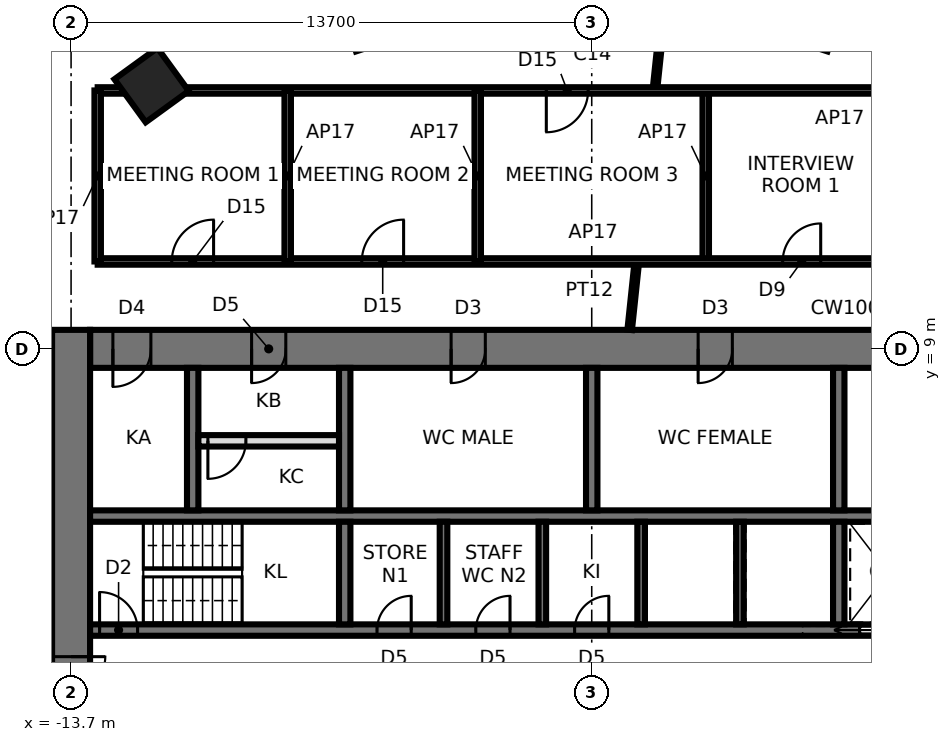
"""IFC4 building model, lengths in metres.
Left out: names, types, materials, properties, quantities, classifications, styles, units other than length and angle.
Written with IfcOpenShell. Run it as: python <this file> out.ifc"""

import sys

from ifc_helpers import new_model, si_unit, direction, frame, frame_2d, origin, origin_2d, place, context, subcontext, project, spatial, rectangle, extrude, element, fill, save


model = new_model("IFC4")
c1 = context("Model", 3, precision=1e-05, world=origin(), true_north=direction((0.0, 1.0)))
c2 = subcontext(c1, "Body", "Model", "MODEL_VIEW")
j1 = project(units=[si_unit("LENGTHUNIT", "METRE"), si_unit("PLANEANGLEUNIT", "RADIAN")], contexts=[c1])
p1 = place(None, origin())
s1 = spatial("IfcSite", under=j1, at=p1, CompositionType="ELEMENT")
p2 = place(p1, origin())
s2 = spatial("IfcBuilding", under=s1, at=p2, CompositionType="ELEMENT")
p3 = place(p2, frame((0.0, 0.0, 234.5)))
s3 = spatial("IfcBuildingStorey", under=s2, at=p3, CompositionType="ELEMENT", Elevation=234.5)
p4 = place(p3, frame((-11.581, 15.94, 0.0), z_axis=(0.0, 0.0, 1.0), x_axis=(-0.587785252292, 0.809016994375, 0.0)))
e1 = element("IfcColumn", 1, at=p4, inside=s3, PredefinedType="COLUMN", context=c2, shape_type="SweptSolid", body=[
    extrude(rectangle(XDim=1.4, YDim=1.4, at=origin_2d()), origin(), (0.0, 0.0, 1.0), 3.9),
])
p5 = place(p3, frame((13.2, 9.0, 0.0), z_axis=(0.0, 0.0, 1.0), x_axis=(-1.0, 0.0, 0.0)))
e2 = element("IfcWall", 2, at=p5, inside=s3, PredefinedType="SHEAR", context=c2, shape_type="SweptSolid", body=[
    extrude(rectangle(XDim=26.4, YDim=1.0, at=frame_2d((13.2, 0.0))), origin(), (0.0, 0.0, 1.0), 3.9),
])
p6 = place(p5, frame((2.65, 0.0, 0.0)))
e3 = element("IfcOpeningElement", 3, at=p6, cuts=e2, PredefinedType="OPENING", context=c2, shape_type="SweptSolid", body=[
    extrude(rectangle(XDim=0.9, YDim=2.1, at=frame_2d((0.45, 1.05))), frame((0.0, 0.51, 0.0), z_axis=(0.0, -1.0, 0.0), x_axis=(1.0, 0.0, 0.0)), (0.0, 0.0, 1.0), 1.02),
])
p7 = place(p5, frame((9.5, 0.0, 0.0)))
e4 = element("IfcOpeningElement", 4, at=p7, cuts=e2, PredefinedType="OPENING", context=c2, shape_type="SweptSolid", body=[
    extrude(rectangle(XDim=0.9, YDim=2.1, at=frame_2d((0.45, 1.05))), frame((0.0, 0.51, 0.0), z_axis=(0.0, -1.0, 0.0), x_axis=(1.0, 0.0, 0.0)), (0.0, 0.0, 1.0), 1.02),
])
p8 = place(p5, frame((16.0, 0.0, 0.0)))
e5 = element("IfcOpeningElement", 5, at=p8, cuts=e2, PredefinedType="OPENING", context=c2, shape_type="SweptSolid", body=[
    extrude(rectangle(XDim=0.9, YDim=2.1, at=frame_2d((0.45, 1.05))), frame((0.0, 0.51, 0.0), z_axis=(0.0, -1.0, 0.0), x_axis=(1.0, 0.0, 0.0)), (0.0, 0.0, 1.0), 1.02),
])
p9 = place(p5, frame((21.25, 0.0, 0.0)))
e6 = element("IfcOpeningElement", 6, at=p9, cuts=e2, PredefinedType="OPENING", context=c2, shape_type="SweptSolid", body=[
    extrude(rectangle(XDim=0.9, YDim=2.1, at=frame_2d((0.45, 1.05))), frame((0.0, 0.51, 0.0), z_axis=(0.0, -1.0, 0.0), x_axis=(1.0, 0.0, 0.0)), (0.0, 0.0, 1.0), 1.02),
])
p10 = place(p5, frame((24.8, 0.0, 0.0)))
e7 = element("IfcOpeningElement", 7, at=p10, cuts=e2, PredefinedType="OPENING", context=c2, shape_type="SweptSolid", body=[
    extrude(rectangle(XDim=1.0, YDim=2.1, at=frame_2d((0.5, 1.05))), frame((0.0, 0.51, 0.0), z_axis=(0.0, -1.0, 0.0), x_axis=(1.0, 0.0, 0.0)), (0.0, 0.0, 1.0), 1.02),
])
p11 = place(p3, frame((-13.7, 9.5, 0.0), z_axis=(0.0, 0.0, 1.0), x_axis=(0.0, -1.0, 0.0)))
e8 = element("IfcWall", 8, at=p11, inside=s3, PredefinedType="SHEAR", context=c2, shape_type="SweptSolid", body=[
    extrude(rectangle(XDim=19.0, YDim=1.0, at=frame_2d((9.5, 0.0))), origin(), (0.0, 0.0, 1.0), 3.9),
])
p12 = place(p11, frame((8.6, 0.0, 0.0)))
e9 = element("IfcOpeningElement", 9, at=p12, cuts=e8, PredefinedType="OPENING", context=c2, shape_type="SweptSolid", body=[
    extrude(rectangle(XDim=1.8, YDim=2.4, at=frame_2d((0.9, 1.2))), frame((0.0, 0.51, 0.0), z_axis=(0.0, -1.0, 0.0), x_axis=(1.0, 0.0, 0.0)), (0.0, 0.0, 1.0), 1.02),
])
p13 = place(p3, frame((-13.2, 1.6, 0.0), z_axis=(0.0, 0.0, 1.0), x_axis=(1.0, 0.0, 0.0)))
e10 = element("IfcWall", 10, at=p13, inside=s3, PredefinedType="SHEAR", context=c2, shape_type="SweptSolid", body=[
    extrude(rectangle(XDim=26.4, YDim=0.3, at=frame_2d((13.2, 0.0))), origin(), (0.0, 0.0, 1.0), 3.9),
])
p14 = place(p13, frame((0.25, 0.0, 0.0)))
e11 = element("IfcOpeningElement", 11, at=p14, cuts=e10, PredefinedType="OPENING", context=c2, shape_type="SweptSolid", body=[
    extrude(rectangle(XDim=1.0, YDim=2.1, at=frame_2d((0.5, 1.05))), frame((0.0, 0.16, 0.0), z_axis=(0.0, -1.0, 0.0), x_axis=(1.0, 0.0, 0.0)), (0.0, 0.0, 1.0), 0.32),
])
p15 = place(p13, frame((23.05, 0.0, 0.0)))
e12 = element("IfcOpeningElement", 12, at=p15, cuts=e10, PredefinedType="OPENING", context=c2, shape_type="SweptSolid", body=[
    extrude(rectangle(XDim=1.1, YDim=2.3, at=frame_2d((0.55, 1.15))), frame((0.0, 0.16, 0.0), z_axis=(0.0, -1.0, 0.0), x_axis=(1.0, 0.0, 0.0)), (0.0, 0.0, 1.0), 0.32),
])
p16 = place(p13, frame((20.25, 0.0, 0.0)))
e13 = element("IfcOpeningElement", 13, at=p16, cuts=e10, PredefinedType="OPENING", context=c2, shape_type="SweptSolid", body=[
    extrude(rectangle(XDim=1.5, YDim=2.4, at=frame_2d((0.75, 1.2))), frame((0.0, 0.16, 0.0), z_axis=(0.0, -1.0, 0.0), x_axis=(1.0, 0.0, 0.0)), (0.0, 0.0, 1.0), 0.32),
])
p17 = place(p13, frame((7.55, 0.0, 0.0)))
e14 = element("IfcOpeningElement", 14, at=p17, cuts=e10, PredefinedType="OPENING", context=c2, shape_type="SweptSolid", body=[
    extrude(rectangle(XDim=0.9, YDim=2.1, at=frame_2d((0.45, 1.05))), frame((0.0, 0.16, 0.0), z_axis=(0.0, -1.0, 0.0), x_axis=(1.0, 0.0, 0.0)), (0.0, 0.0, 1.0), 0.32),
])
p18 = place(p13, frame((10.15, 0.0, 0.0)))
e15 = element("IfcOpeningElement", 15, at=p18, cuts=e10, PredefinedType="OPENING", context=c2, shape_type="SweptSolid", body=[
    extrude(rectangle(XDim=0.9, YDim=2.1, at=frame_2d((0.45, 1.05))), frame((0.0, 0.16, 0.0), z_axis=(0.0, -1.0, 0.0), x_axis=(1.0, 0.0, 0.0)), (0.0, 0.0, 1.0), 0.32),
])
p19 = place(p13, frame((12.75, 0.0, 0.0)))
e16 = element("IfcOpeningElement", 16, at=p19, cuts=e10, PredefinedType="OPENING", context=c2, shape_type="SweptSolid", body=[
    extrude(rectangle(XDim=0.9, YDim=2.1, at=frame_2d((0.45, 1.05))), frame((0.0, 0.16, 0.0), z_axis=(0.0, -1.0, 0.0), x_axis=(1.0, 0.0, 0.0)), (0.0, 0.0, 1.0), 0.32),
])
p20 = place(p13, frame((25.45, 0.0, 0.0)))
e17 = element("IfcOpeningElement", 17, at=p20, cuts=e10, PredefinedType="OPENING", context=c2, shape_type="SweptSolid", body=[
    extrude(rectangle(XDim=0.9, YDim=2.1, at=frame_2d((0.45, 1.05))), frame((0.0, 0.16, 0.0), z_axis=(0.0, -1.0, 0.0), x_axis=(1.0, 0.0, 0.0)), (0.0, 0.0, 1.0), 0.32),
])
p21 = place(p3, frame((-13.2, 4.6, 0.0), z_axis=(0.0, 0.0, 1.0), x_axis=(1.0, 0.0, 0.0)))
e18 = element("IfcWall", 18, at=p21, inside=s3, PredefinedType="SHEAR", context=c2, shape_type="SweptSolid", body=[
    extrude(rectangle(XDim=26.4, YDim=0.3, at=frame_2d((13.2, 0.0))), origin(), (0.0, 0.0, 1.0), 3.9),
])
p22 = place(p3, frame((-6.5, 1.75, 0.0), z_axis=(0.0, 0.0, 1.0), x_axis=(0.0, 1.0, 0.0)))
e19 = element("IfcWall", 19, at=p22, inside=s3, PredefinedType="SHEAR", context=c2, shape_type="SweptSolid", body=[
    extrude(rectangle(XDim=2.7, YDim=0.3, at=frame_2d((1.35, 0.0))), origin(), (0.0, 0.0, 1.0), 3.9),
])
p23 = place(p3, frame((-6.5, 4.75, 0.0), z_axis=(0.0, 0.0, 1.0), x_axis=(0.0, 1.0, 0.0)))
e20 = element("IfcWall", 20, at=p23, inside=s3, PredefinedType="SHEAR", context=c2, shape_type="SweptSolid", body=[
    extrude(rectangle(XDim=3.75, YDim=0.3, at=frame_2d((1.875, 0.0))), origin(), (0.0, 0.0, 1.0), 3.9),
])
p24 = place(p3, frame((6.5, 1.75, 0.0), z_axis=(0.0, 0.0, 1.0), x_axis=(0.0, 1.0, 0.0)))
e21 = element("IfcWall", 21, at=p24, inside=s3, PredefinedType="SHEAR", context=c2, shape_type="SweptSolid", body=[
    extrude(rectangle(XDim=2.7, YDim=0.3, at=frame_2d((1.35, 0.0))), origin(), (0.0, 0.0, 1.0), 3.9),
])
p25 = place(p3, frame((6.5, 4.75, 0.0), z_axis=(0.0, 0.0, 1.0), x_axis=(0.0, 1.0, 0.0)))
e22 = element("IfcWall", 22, at=p25, inside=s3, PredefinedType="SHEAR", context=c2, shape_type="SweptSolid", body=[
    extrude(rectangle(XDim=3.75, YDim=0.3, at=frame_2d((1.875, 0.0))), origin(), (0.0, 0.0, 1.0), 3.9),
])
for number, where, z_axis, x_axis in (
    (23, (-3.9, 1.75, 0.0), (0.0, 0.0, 1.0), (0.0, 1.0, 0.0)),
    (24, (-1.3, 1.75, 0.0), (0.0, 0.0, 1.0), (0.0, 1.0, 0.0)),
    (25, (1.3, 1.75, 0.0), (0.0, 0.0, 1.0), (0.0, 1.0, 0.0)),
    (26, (3.9, 1.75, 0.0), (0.0, 0.0, 1.0), (0.0, 1.0, 0.0)),
):
    element("IfcWall", number, at=place(p3, frame(where, z_axis=z_axis, x_axis=x_axis)), inside=s3, PredefinedType="SHEAR", context=c2, shape_type="SweptSolid", body=[
        extrude(rectangle(XDim=2.7, YDim=0.2, at=frame_2d((1.35, 0.0))), origin(), (0.0, 0.0, 1.0), 3.9),
    ])
for number, where, z_axis, x_axis in (
    (27, (0.0, 4.75, 0.0), (0.0, 0.0, 1.0), (0.0, 1.0, 0.0)),
    (28, (-10.5, 4.75, 0.0), (0.0, 0.0, 1.0), (0.0, 1.0, 0.0)),
):
    element("IfcWall", number, at=place(p3, frame(where, z_axis=z_axis, x_axis=x_axis)), inside=s3, PredefinedType="SHEAR", context=c2, shape_type="SweptSolid", body=[
        extrude(rectangle(XDim=3.75, YDim=0.3, at=frame_2d((1.875, 0.0))), origin(), (0.0, 0.0, 1.0), 3.9),
    ])
p26 = place(p3, frame((-10.35, 6.58, 0.0), z_axis=(0.0, 0.0, 1.0), x_axis=(1.0, 0.0, 0.0)))
e29 = element("IfcWall", 29, at=p26, inside=s3, PredefinedType="PARTITIONING", context=c2, shape_type="SweptSolid", body=[
    extrude(rectangle(XDim=3.7, YDim=0.3, at=frame_2d((1.85, 0.0))), origin(), (0.0, 0.0, 1.0), 3.74),
])
p27 = place(p26, frame((0.25, 0.0, 0.0)))
e30 = element("IfcOpeningElement", 30, at=p27, cuts=e29, PredefinedType="OPENING", context=c2, shape_type="SweptSolid", body=[
    extrude(rectangle(XDim=1.0, YDim=2.4, at=frame_2d((0.5, 1.2))), frame((0.0, 0.16, 0.0), z_axis=(0.0, -1.0, 0.0), x_axis=(1.0, 0.0, 0.0)), (0.0, 0.0, 1.0), 0.32),
])
p28 = place(p3, frame((3.0, 15.8, 0.0), z_axis=(0.0, 0.0, 1.0), x_axis=(0.0, -1.0, 0.0)))
e31 = element("IfcWall", 31, at=p28, inside=s3, PredefinedType="PARTITIONING", context=c2, shape_type="SweptSolid", body=[
    extrude(rectangle(XDim=4.5, YDim=0.17, at=frame_2d((2.25, 0.0))), origin(), (0.0, 0.0, 1.0), 3.74),
])
p29 = place(p3, frame((1.661, 15.8, 0.0), z_axis=(0.0, 0.0, 1.0), x_axis=(0.104548874513, 0.994519749848, 0.0)))
e32 = element("IfcWall", 32, at=p29, inside=s3, PredefinedType="PARTITIONING", context=c2, shape_type="SweptSolid", body=[
    extrude(rectangle(XDim=4.302, YDim=0.12, at=frame_2d((2.151, 0.0))), origin(), (0.0, 0.0, 1.0), 3.74),
])
p30 = place(p3, frame((0.999, 9.5, 0.0), z_axis=(0.0, 0.0, 1.0), x_axis=(0.104537331683, 0.99452096322, 0.0)))
e33 = element("IfcWall", 33, at=p30, inside=s3, PredefinedType="PARTITIONING", context=c2, shape_type="SweptSolid", body=[
    extrude(rectangle(XDim=1.81, YDim=0.12, at=frame_2d((0.905, 0.0))), origin(), (0.0, 0.0, 1.0), 3.74),
])
p31 = place(p3, frame((-13.0, 11.3, 0.0), z_axis=(0.0, 0.0, 1.0), x_axis=(1.0, 0.0, 0.0)))
e34 = element("IfcWall", 34, at=p31, inside=s3, PredefinedType="PARTITIONING", context=c2, shape_type="SweptSolid", body=[
    extrude(rectangle(XDim=26.0, YDim=0.17, at=frame_2d((13.0, 0.0))), origin(), (0.0, 0.0, 1.0), 3.74),
])
p32 = place(p31, frame((1.95, 0.0, 0.0)))
e35 = element("IfcOpeningElement", 35, at=p32, cuts=e34, PredefinedType="OPENING", context=c2, shape_type="SweptSolid", body=[
    extrude(rectangle(XDim=1.1, YDim=2.4, at=frame_2d((0.55, 1.2))), frame((0.0, 0.095, 0.0), z_axis=(0.0, -1.0, 0.0), x_axis=(1.0, 0.0, 0.0)), (0.0, 0.0, 1.0), 0.19),
])
p33 = place(p31, frame((6.95, 0.0, 0.0)))
e36 = element("IfcOpeningElement", 36, at=p33, cuts=e34, PredefinedType="OPENING", context=c2, shape_type="SweptSolid", body=[
    extrude(rectangle(XDim=1.1, YDim=2.4, at=frame_2d((0.55, 1.2))), frame((0.0, 0.095, 0.0), z_axis=(0.0, -1.0, 0.0), x_axis=(1.0, 0.0, 0.0)), (0.0, 0.0, 1.0), 0.19),
])
p34 = place(p31, frame((18.025, 0.0, 0.0)))
e37 = element("IfcOpeningElement", 37, at=p34, cuts=e34, PredefinedType="OPENING", context=c2, shape_type="SweptSolid", body=[
    extrude(rectangle(XDim=1.0, YDim=2.4, at=frame_2d((0.5, 1.2))), frame((0.0, 0.095, 0.0), z_axis=(0.0, -1.0, 0.0), x_axis=(1.0, 0.0, 0.0)), (0.0, 0.0, 1.0), 0.19),
])
p35 = place(p31, frame((23.025, 0.0, 0.0)))
e38 = element("IfcOpeningElement", 38, at=p35, cuts=e34, PredefinedType="OPENING", context=c2, shape_type="SweptSolid", body=[
    extrude(rectangle(XDim=1.0, YDim=2.4, at=frame_2d((0.5, 1.2))), frame((0.0, 0.095, 0.0), z_axis=(0.0, -1.0, 0.0), x_axis=(1.0, 0.0, 0.0)), (0.0, 0.0, 1.0), 0.19),
])
p36 = place(p3, frame((13.0, 15.8, 0.0), z_axis=(0.0, 0.0, 1.0), x_axis=(-1.0, 0.0, 0.0)))
e39 = element("IfcWall", 39, at=p36, inside=s3, PredefinedType="PARTITIONING", context=c2, shape_type="SweptSolid", body=[
    extrude(rectangle(XDim=26.0, YDim=0.17, at=frame_2d((13.0, 0.0))), origin(), (0.0, 0.0, 1.0), 3.74),
])
p37 = place(p36, frame((13.095, 0.0, 0.0)))
e40 = element("IfcOpeningElement", 40, at=p37, cuts=e39, PredefinedType="OPENING", context=c2, shape_type="SweptSolid", body=[
    extrude(rectangle(XDim=1.1, YDim=2.4, at=frame_2d((0.55, 1.2))), frame((0.0, 0.095, 0.0), z_axis=(0.0, -1.0, 0.0), x_axis=(1.0, 0.0, 0.0)), (0.0, 0.0, 1.0), 0.19),
])
for number, where, z_axis, x_axis in (
    (41, (-3.0, 15.8, 0.0), (0.0, 0.0, 1.0), (0.0, -1.0, 0.0)),
    (42, (-8.0, 15.8, 0.0), (0.0, 0.0, 1.0), (0.0, -1.0, 0.0)),
    (43, (-13.0, 15.8, 0.0), (0.0, 0.0, 1.0), (0.0, -1.0, 0.0)),
):
    element("IfcWall", number, at=place(p3, frame(where, z_axis=z_axis, x_axis=x_axis)), inside=s3, PredefinedType="PARTITIONING", context=c2, shape_type="SweptSolid", body=[
        extrude(rectangle(XDim=4.5, YDim=0.17, at=frame_2d((2.25, 0.0))), origin(), (0.0, 0.0, 1.0), 3.74),
    ])
p38 = place(p12, origin())
e44 = element("IfcDoor", 44, at=p38, inside=s3, OperationType="DOUBLE_DOOR_SINGLE_SWING", PredefinedType="DOOR", context=c2, shape_type="SweptSolid", body=[
    extrude(rectangle(XDim=1.72, YDim=2.36, at=frame_2d((0.9, 1.18))), frame((0.0, 0.025, 0.0), z_axis=(0.0, -1.0, 0.0), x_axis=(1.0, 0.0, 0.0)), (0.0, 0.0, 1.0), 0.05),
    extrude(rectangle(XDim=0.04, YDim=2.4, at=frame_2d((0.02, 1.2))), frame((0.0, 0.25, 0.0), z_axis=(0.0, -1.0, 0.0), x_axis=(1.0, 0.0, 0.0)), (0.0, 0.0, 1.0), 0.5),
    extrude(rectangle(XDim=0.04, YDim=2.4, at=frame_2d((1.78, 1.2))), frame((0.0, 0.25, 0.0), z_axis=(0.0, -1.0, 0.0), x_axis=(1.0, 0.0, 0.0)), (0.0, 0.0, 1.0), 0.5),
    extrude(rectangle(XDim=1.72, YDim=0.04, at=frame_2d((0.9, 2.38))), frame((0.0, 0.25, 0.0), z_axis=(0.0, -1.0, 0.0), x_axis=(1.0, 0.0, 0.0)), (0.0, 0.0, 1.0), 0.5),
])
fill(e9, e44)
p39 = place(p14, origin())
e45 = element("IfcDoor", 45, at=p39, inside=s3, OperationType="SINGLE_SWING_LEFT", PredefinedType="DOOR", context=c2, shape_type="SweptSolid", body=[
    extrude(rectangle(XDim=1.0, YDim=2.1, at=frame_2d((0.5, 1.05))), frame((0.0, 0.025, 0.0), z_axis=(0.0, -1.0, 0.0), x_axis=(1.0, 0.0, 0.0)), (0.0, 0.0, 1.0), 0.05),
])
fill(e11, e45)
p40 = place(p16, origin())
e46 = element("IfcDoor", 46, at=p40, inside=s3, OperationType="SLIDING_TO_LEFT", PredefinedType="DOOR", context=c2, shape_type="SweptSolid", body=[
    extrude(rectangle(XDim=1.5, YDim=2.4, at=frame_2d((0.75, 1.2))), frame((0.0, 0.025, 0.0), z_axis=(0.0, -1.0, 0.0), x_axis=(1.0, 0.0, 0.0)), (0.0, 0.0, 1.0), 0.05),
])
fill(e13, e46)
p41 = place(p17, origin())
e47 = element("IfcDoor", 47, at=p41, inside=s3, OperationType="SINGLE_SWING_RIGHT", PredefinedType="DOOR", context=c2, shape_type="SweptSolid", body=[
    extrude(rectangle(XDim=0.9, YDim=2.1, at=frame_2d((0.45, 1.05))), frame((0.0, 0.025, 0.0), z_axis=(0.0, -1.0, 0.0), x_axis=(1.0, 0.0, 0.0)), (0.0, 0.0, 1.0), 0.05),
])
fill(e14, e47)
p42 = place(p18, origin())
e48 = element("IfcDoor", 48, at=p42, inside=s3, OperationType="SINGLE_SWING_RIGHT", PredefinedType="DOOR", context=c2, shape_type="SweptSolid", body=[
    extrude(rectangle(XDim=0.9, YDim=2.1, at=frame_2d((0.45, 1.05))), frame((0.0, 0.025, 0.0), z_axis=(0.0, -1.0, 0.0), x_axis=(1.0, 0.0, 0.0)), (0.0, 0.0, 1.0), 0.05),
])
fill(e15, e48)
p43 = place(p19, origin())
e49 = element("IfcDoor", 49, at=p43, inside=s3, OperationType="SINGLE_SWING_RIGHT", PredefinedType="DOOR", context=c2, shape_type="SweptSolid", body=[
    extrude(rectangle(XDim=0.9, YDim=2.1, at=frame_2d((0.45, 1.05))), frame((0.0, 0.025, 0.0), z_axis=(0.0, -1.0, 0.0), x_axis=(1.0, 0.0, 0.0)), (0.0, 0.0, 1.0), 0.05),
])
fill(e16, e49)
p44 = place(p7, origin())
e50 = element("IfcDoor", 50, at=p44, inside=s3, OperationType="SINGLE_SWING_RIGHT", PredefinedType="DOOR", context=c2, shape_type="SweptSolid", body=[
    extrude(rectangle(XDim=0.82, YDim=2.06, at=frame_2d((0.45, 1.03))), frame((0.0, 0.025, 0.0), z_axis=(0.0, -1.0, 0.0), x_axis=(1.0, 0.0, 0.0)), (0.0, 0.0, 1.0), 0.05),
    extrude(rectangle(XDim=0.04, YDim=2.1, at=frame_2d((0.02, 1.05))), frame((0.0, 0.25, 0.0), z_axis=(0.0, -1.0, 0.0), x_axis=(1.0, 0.0, 0.0)), (0.0, 0.0, 1.0), 0.5),
    extrude(rectangle(XDim=0.04, YDim=2.1, at=frame_2d((0.88, 1.05))), frame((0.0, 0.25, 0.0), z_axis=(0.0, -1.0, 0.0), x_axis=(1.0, 0.0, 0.0)), (0.0, 0.0, 1.0), 0.5),
    extrude(rectangle(XDim=0.82, YDim=0.04, at=frame_2d((0.45, 2.08))), frame((0.0, 0.25, 0.0), z_axis=(0.0, -1.0, 0.0), x_axis=(1.0, 0.0, 0.0)), (0.0, 0.0, 1.0), 0.5),
])
fill(e4, e50)
p45 = place(p8, origin())
e51 = element("IfcDoor", 51, at=p45, inside=s3, OperationType="SINGLE_SWING_RIGHT", PredefinedType="DOOR", context=c2, shape_type="SweptSolid", body=[
    extrude(rectangle(XDim=0.82, YDim=2.06, at=frame_2d((0.45, 1.03))), frame((0.0, 0.025, 0.0), z_axis=(0.0, -1.0, 0.0), x_axis=(1.0, 0.0, 0.0)), (0.0, 0.0, 1.0), 0.05),
    extrude(rectangle(XDim=0.04, YDim=2.1, at=frame_2d((0.02, 1.05))), frame((0.0, 0.25, 0.0), z_axis=(0.0, -1.0, 0.0), x_axis=(1.0, 0.0, 0.0)), (0.0, 0.0, 1.0), 0.5),
    extrude(rectangle(XDim=0.04, YDim=2.1, at=frame_2d((0.88, 1.05))), frame((0.0, 0.25, 0.0), z_axis=(0.0, -1.0, 0.0), x_axis=(1.0, 0.0, 0.0)), (0.0, 0.0, 1.0), 0.5),
    extrude(rectangle(XDim=0.82, YDim=0.04, at=frame_2d((0.45, 2.08))), frame((0.0, 0.25, 0.0), z_axis=(0.0, -1.0, 0.0), x_axis=(1.0, 0.0, 0.0)), (0.0, 0.0, 1.0), 0.5),
])
fill(e5, e51)
p46 = place(p9, origin())
e52 = element("IfcDoor", 52, at=p46, inside=s3, OperationType="SINGLE_SWING_RIGHT", PredefinedType="DOOR", context=c2, shape_type="SweptSolid", body=[
    extrude(rectangle(XDim=0.82, YDim=2.06, at=frame_2d((0.45, 1.03))), frame((0.0, 0.025, 0.0), z_axis=(0.0, -1.0, 0.0), x_axis=(1.0, 0.0, 0.0)), (0.0, 0.0, 1.0), 0.05),
    extrude(rectangle(XDim=0.04, YDim=2.1, at=frame_2d((0.02, 1.05))), frame((0.0, 0.25, 0.0), z_axis=(0.0, -1.0, 0.0), x_axis=(1.0, 0.0, 0.0)), (0.0, 0.0, 1.0), 0.5),
    extrude(rectangle(XDim=0.04, YDim=2.1, at=frame_2d((0.88, 1.05))), frame((0.0, 0.25, 0.0), z_axis=(0.0, -1.0, 0.0), x_axis=(1.0, 0.0, 0.0)), (0.0, 0.0, 1.0), 0.5),
    extrude(rectangle(XDim=0.82, YDim=0.04, at=frame_2d((0.45, 2.08))), frame((0.0, 0.25, 0.0), z_axis=(0.0, -1.0, 0.0), x_axis=(1.0, 0.0, 0.0)), (0.0, 0.0, 1.0), 0.5),
])
fill(e6, e52)
p47 = place(p10, origin())
e53 = element("IfcDoor", 53, at=p47, inside=s3, OperationType="SINGLE_SWING_RIGHT", PredefinedType="DOOR", context=c2, shape_type="SweptSolid", body=[
    extrude(rectangle(XDim=0.92, YDim=2.06, at=frame_2d((0.5, 1.03))), frame((0.0, 0.025, 0.0), z_axis=(0.0, -1.0, 0.0), x_axis=(1.0, 0.0, 0.0)), (0.0, 0.0, 1.0), 0.05),
    extrude(rectangle(XDim=0.04, YDim=2.1, at=frame_2d((0.02, 1.05))), frame((0.0, 0.25, 0.0), z_axis=(0.0, -1.0, 0.0), x_axis=(1.0, 0.0, 0.0)), (0.0, 0.0, 1.0), 0.5),
    extrude(rectangle(XDim=0.04, YDim=2.1, at=frame_2d((0.98, 1.05))), frame((0.0, 0.25, 0.0), z_axis=(0.0, -1.0, 0.0), x_axis=(1.0, 0.0, 0.0)), (0.0, 0.0, 1.0), 0.5),
    extrude(rectangle(XDim=0.92, YDim=0.04, at=frame_2d((0.5, 2.08))), frame((0.0, 0.25, 0.0), z_axis=(0.0, -1.0, 0.0), x_axis=(1.0, 0.0, 0.0)), (0.0, 0.0, 1.0), 0.5),
])
fill(e7, e53)
p48 = place(p27, frame((1.0, 0.0, 0.0), z_axis=(0.0, 0.0, 1.0), x_axis=(-1.0, 0.0, 0.0)))
e54 = element("IfcDoor", 54, at=p48, inside=s3, OperationType="SINGLE_SWING_RIGHT", PredefinedType="DOOR", context=c2, shape_type="SweptSolid", body=[
    extrude(rectangle(XDim=1.0, YDim=2.4, at=frame_2d((0.5, 1.2))), frame((0.0, 0.025, 0.0), z_axis=(0.0, -1.0, 0.0), x_axis=(1.0, 0.0, 0.0)), (0.0, 0.0, 1.0), 0.05),
])
fill(e30, e54)
p49 = place(p32, origin())
e55 = element("IfcDoor", 55, at=p49, inside=s3, OperationType="SINGLE_SWING_RIGHT", PredefinedType="DOOR", context=c2, shape_type="SweptSolid", body=[
    extrude(rectangle(XDim=1.1, YDim=2.4, at=frame_2d((0.55, 1.2))), frame((0.0, 0.025, 0.0), z_axis=(0.0, -1.0, 0.0), x_axis=(1.0, 0.0, 0.0)), (0.0, 0.0, 1.0), 0.05),
])
fill(e35, e55)
p50 = place(p33, origin())
e56 = element("IfcDoor", 56, at=p50, inside=s3, OperationType="SINGLE_SWING_RIGHT", PredefinedType="DOOR", context=c2, shape_type="SweptSolid", body=[
    extrude(rectangle(XDim=1.1, YDim=2.4, at=frame_2d((0.55, 1.2))), frame((0.0, 0.025, 0.0), z_axis=(0.0, -1.0, 0.0), x_axis=(1.0, 0.0, 0.0)), (0.0, 0.0, 1.0), 0.05),
])
fill(e36, e56)
p51 = place(p37, origin())
e57 = element("IfcDoor", 57, at=p51, inside=s3, OperationType="SINGLE_SWING_RIGHT", PredefinedType="DOOR", context=c2, shape_type="SweptSolid", body=[
    extrude(rectangle(XDim=1.1, YDim=2.4, at=frame_2d((0.55, 1.2))), frame((0.0, 0.025, 0.0), z_axis=(0.0, -1.0, 0.0), x_axis=(1.0, 0.0, 0.0)), (0.0, 0.0, 1.0), 0.05),
])
fill(e40, e57)
p52 = place(p34, origin())
e58 = element("IfcDoor", 58, at=p52, inside=s3, OperationType="SINGLE_SWING_RIGHT", PredefinedType="DOOR", context=c2, shape_type="SweptSolid", body=[
    extrude(rectangle(XDim=1.0, YDim=2.4, at=frame_2d((0.5, 1.2))), frame((0.0, 0.025, 0.0), z_axis=(0.0, -1.0, 0.0), x_axis=(1.0, 0.0, 0.0)), (0.0, 0.0, 1.0), 0.05),
])
fill(e37, e58)
save(model, sys.argv[1])
